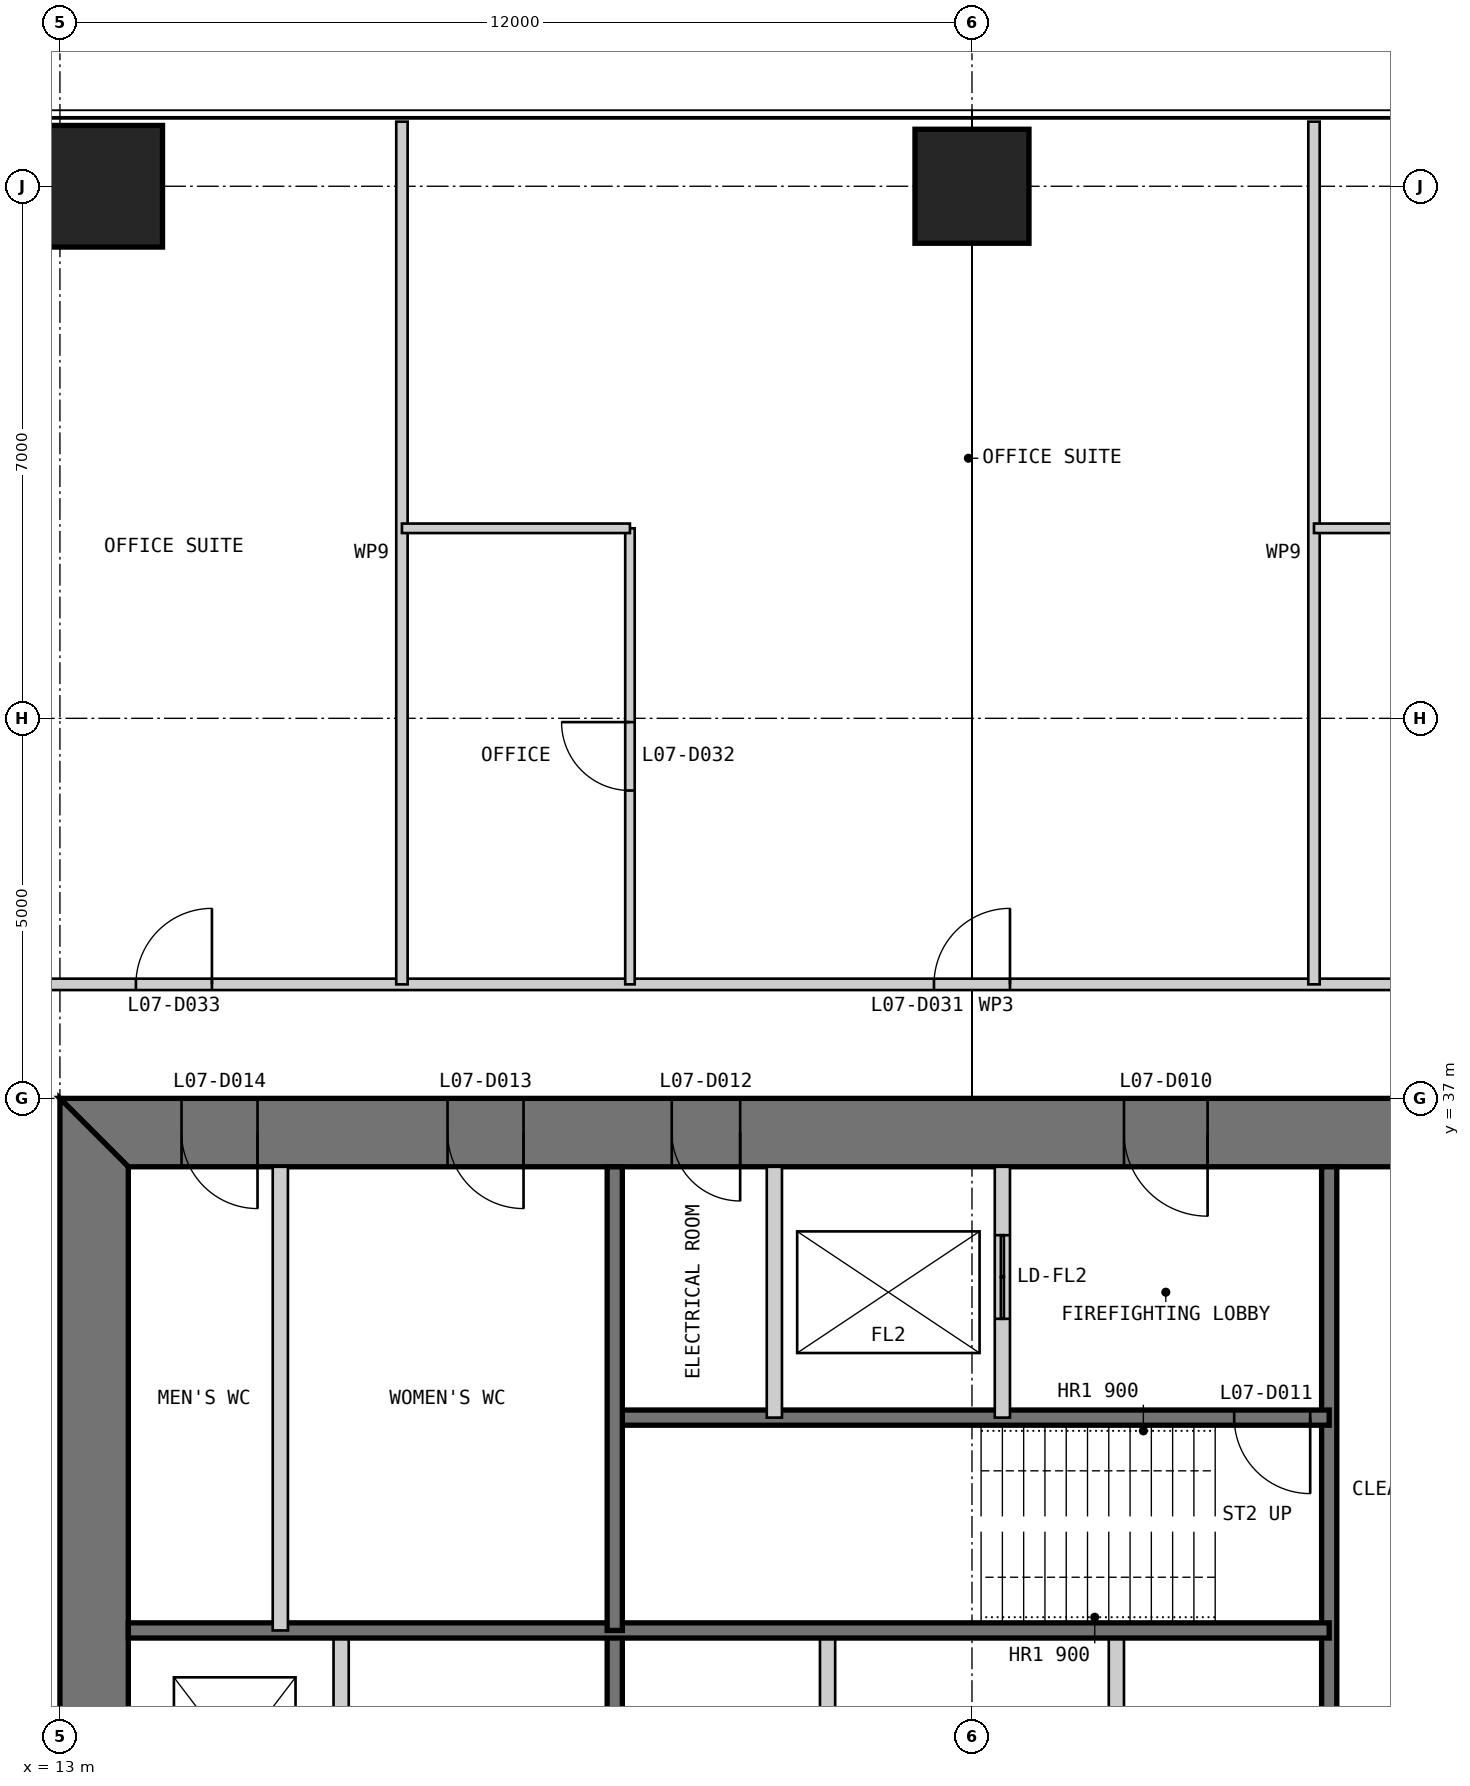
"""IFC4 building model, lengths in metres.
Left out: names, types, materials, properties, quantities, classifications, styles, units other than length and angle.
Written with IfcOpenShell. Run it as: python <this file> out.ifc"""

import sys

from ifc_helpers import new_model, si_unit, direction, frame, frame_2d, origin, origin_2d, place, context, subcontext, project, spatial, polyline, rectangle, outline, extrude, element, fill, save


model = new_model("IFC4")
c1 = context("Model", 3, precision=1e-05, world=origin(), true_north=direction((0.0, 1.0)))
c2 = subcontext(c1, "Body", "Model", "MODEL_VIEW")
j1 = project(units=[si_unit("LENGTHUNIT", "METRE"), si_unit("PLANEANGLEUNIT", "RADIAN")], contexts=[c1])
p1 = place(None, origin())
s1 = spatial("IfcSite", under=j1, at=p1, CompositionType="ELEMENT")
p2 = place(p1, origin())
s2 = spatial("IfcBuilding", under=s1, at=p2, CompositionType="ELEMENT")
p3 = place(p2, frame((0.0, 0.0, 35.0)))
s3 = spatial("IfcBuildingStorey", under=s2, at=p3, CompositionType="ELEMENT", Elevation=35.0)
p4 = place(p3, frame((25.0, 49.0, 0.0), z_axis=(0.0, 0.0, 1.0), x_axis=(1.0, 0.0, 0.0)))
e1 = element("IfcColumn", 1, at=p4, inside=s3, PredefinedType="COLUMN", context=c2, shape_type="SweptSolid", body=[
    extrude(rectangle(XDim=1.5, YDim=1.5, at=origin_2d()), origin(), (0.0, 0.0, 1.0), 4.0),
])
p5 = place(p3, frame((13.0, 49.0, 0.0), z_axis=(0.0, 0.0, 1.0), x_axis=(1.0, 0.0, 0.0)))
e2 = element("IfcColumn", 2, at=p5, inside=s3, PredefinedType="COLUMN", context=c2, shape_type="SweptSolid", body=[
    extrude(rectangle(XDim=2.7, YDim=1.6, at=origin_2d()), origin(), (0.0, 0.0, 1.0), 4.0),
])
p6 = place(p3, frame((37.0, 36.55, 0.0), z_axis=(0.0, 0.0, 1.0), x_axis=(-1.0, 0.0, 0.0)))
e3 = element("IfcWall", 3, at=p6, inside=s3, PredefinedType="SHEAR", context=c2, shape_type="SweptSolid", body=[
    extrude(outline(polyline([(0.0, -0.45), (24.0, -0.45), (23.1, 0.45), (0.9, 0.45), (0.0, -0.45)])), origin(), (0.0, 0.0, 1.0), 4.0),
])
p7 = place(p6, frame((4.9, 0.0, 0.0)))
e4 = element("IfcOpeningElement", 4, at=p7, cuts=e3, PredefinedType="OPENING", context=c2, shape_type="SweptSolid", body=[
    extrude(rectangle(XDim=1.0, YDim=2.2, at=frame_2d((0.5, 1.1))), frame((0.0, 0.46, 0.0), z_axis=(0.0, -1.0, 0.0), x_axis=(1.0, 0.0, 0.0)), (0.0, 0.0, 1.0), 0.92),
])
p8 = place(p6, frame((8.9, 0.0, 0.0)))
e5 = element("IfcOpeningElement", 5, at=p8, cuts=e3, PredefinedType="OPENING", context=c2, shape_type="SweptSolid", body=[
    extrude(rectangle(XDim=1.1, YDim=2.2, at=frame_2d((0.55, 1.1))), frame((0.0, 0.46, 0.0), z_axis=(0.0, -1.0, 0.0), x_axis=(1.0, 0.0, 0.0)), (0.0, 0.0, 1.0), 0.92),
])
p9 = place(p6, frame((15.05, 0.0, 0.0)))
e6 = element("IfcOpeningElement", 6, at=p9, cuts=e3, PredefinedType="OPENING", context=c2, shape_type="SweptSolid", body=[
    extrude(rectangle(XDim=0.9, YDim=2.2, at=frame_2d((0.45, 1.1))), frame((0.0, 0.46, 0.0), z_axis=(0.0, -1.0, 0.0), x_axis=(1.0, 0.0, 0.0)), (0.0, 0.0, 1.0), 0.92),
])
p10 = place(p6, frame((17.9, 0.0, 0.0)))
e7 = element("IfcOpeningElement", 7, at=p10, cuts=e3, PredefinedType="OPENING", context=c2, shape_type="SweptSolid", body=[
    extrude(rectangle(XDim=1.0, YDim=2.2, at=frame_2d((0.5, 1.1))), frame((0.0, 0.46, 0.0), z_axis=(0.0, -1.0, 0.0), x_axis=(1.0, 0.0, 0.0)), (0.0, 0.0, 1.0), 0.92),
])
p11 = place(p6, frame((21.4, 0.0, 0.0)))
e8 = element("IfcOpeningElement", 8, at=p11, cuts=e3, PredefinedType="OPENING", context=c2, shape_type="SweptSolid", body=[
    extrude(rectangle(XDim=1.0, YDim=2.2, at=frame_2d((0.5, 1.1))), frame((0.0, 0.46, 0.0), z_axis=(0.0, -1.0, 0.0), x_axis=(1.0, 0.0, 0.0)), (0.0, 0.0, 1.0), 0.92),
])
p12 = place(p3, frame((13.45, 36.1, 0.0), z_axis=(0.0, 0.0, 1.0), x_axis=(0.0, -1.0, 0.0)))
e9 = element("IfcWall", 9, at=p12, inside=s3, PredefinedType="SHEAR", context=c2, shape_type="SweptSolid", body=[
    extrude(outline(polyline([(-0.9, -0.45), (23.1, -0.45), (22.2, 0.45), (0.0, 0.45), (-0.9, -0.45)])), origin(), (0.0, 0.0, 1.0), 4.0),
])
p13 = place(p12, frame((20.2, 0.0, 0.0)))
e10 = element("IfcOpeningElement", 10, at=p13, cuts=e9, PredefinedType="OPENING", context=c2, shape_type="SweptSolid", body=[
    extrude(rectangle(XDim=1.0, YDim=2.2, at=frame_2d((0.5, 1.1))), frame((0.0, 0.46, 0.0), z_axis=(0.0, -1.0, 0.0), x_axis=(1.0, 0.0, 0.0)), (0.0, 0.0, 1.0), 0.92),
])
p14 = place(p12, frame((17.25, 0.0, 0.0)))
e11 = element("IfcOpeningElement", 11, at=p14, cuts=e9, PredefinedType="OPENING", context=c2, shape_type="SweptSolid", body=[
    extrude(rectangle(XDim=0.9, YDim=2.2, at=frame_2d((0.45, 1.1))), frame((0.0, 0.46, 0.0), z_axis=(0.0, -1.0, 0.0), x_axis=(1.0, 0.0, 0.0)), (0.0, 0.0, 1.0), 0.92),
])
p15 = place(p3, frame((16.7, 13.9, 0.0), z_axis=(0.0, 0.0, 1.0), x_axis=(0.0, 1.0, 0.0)))
e12 = element("IfcWall", 12, at=p15, inside=s3, PredefinedType="PARTITIONING", context=c2, shape_type="SweptSolid", body=[
    extrude(rectangle(XDim=16.1, YDim=0.2, at=frame_2d((8.05, 0.0))), origin(), (0.0, 0.0, 1.0), 3.8),
])
p16 = place(p15, frame((7.217, 0.0, 0.0)))
e13 = element("IfcOpeningElement", 13, at=p16, cuts=e12, PredefinedType="OPENING", context=c2, shape_type="SweptSolid", body=[
    extrude(rectangle(XDim=1.1, YDim=2.2, at=frame_2d((0.55, 1.1))), frame((0.0, 0.11, 0.0), z_axis=(0.0, -1.0, 0.0), x_axis=(1.0, 0.0, 0.0)), (0.0, 0.0, 1.0), 0.22),
])
p17 = place(p15, frame((10.55, 0.0, 0.0)))
e14 = element("IfcOpeningElement", 14, at=p17, cuts=e12, PredefinedType="OPENING", context=c2, shape_type="SweptSolid", body=[
    extrude(rectangle(XDim=1.1, YDim=2.2, at=frame_2d((0.55, 1.1))), frame((0.0, 0.11, 0.0), z_axis=(0.0, -1.0, 0.0), x_axis=(1.0, 0.0, 0.0)), (0.0, 0.0, 1.0), 0.22),
])
p18 = place(p15, frame((13.883, 0.0, 0.0)))
e15 = element("IfcOpeningElement", 15, at=p18, cuts=e12, PredefinedType="OPENING", context=c2, shape_type="SweptSolid", body=[
    extrude(rectangle(XDim=1.1, YDim=2.2, at=frame_2d((0.55, 1.1))), frame((0.0, 0.11, 0.0), z_axis=(0.0, -1.0, 0.0), x_axis=(1.0, 0.0, 0.0)), (0.0, 0.0, 1.0), 0.22),
])
p19 = place(p3, frame((20.3, 13.9, 0.0), z_axis=(0.0, 0.0, 1.0), x_axis=(0.0, 1.0, 0.0)))
e16 = element("IfcWall", 16, at=p19, inside=s3, PredefinedType="SOLIDWALL", context=c2, shape_type="SweptSolid", body=[
    extrude(rectangle(XDim=16.1, YDim=0.2, at=frame_2d((8.05, 0.0))), origin(), (0.0, 0.0, 1.0), 3.8),
])
p20 = place(p3, frame((23.1, 20.0, 0.0), z_axis=(0.0, 0.0, 1.0), x_axis=(0.0, 1.0, 0.0)))
e17 = element("IfcWall", 17, at=p20, inside=s3, PredefinedType="PARTITIONING", context=c2, shape_type="SweptSolid", body=[
    extrude(rectangle(XDim=10.0, YDim=0.2, at=frame_2d((5.0, 0.0))), origin(), (0.0, 0.0, 1.0), 3.8),
])
p21 = place(p3, frame((29.7, 36.1, 0.0), z_axis=(0.0, 0.0, 1.0), x_axis=(0.0, -1.0, 0.0)))
e18 = element("IfcWall", 18, at=p21, inside=s3, PredefinedType="SOLIDWALL", context=c2, shape_type="SweptSolid", body=[
    extrude(rectangle(XDim=16.1, YDim=0.2, at=frame_2d((8.05, 0.0))), origin(), (0.0, 0.0, 1.0), 3.8),
])
p22 = place(p3, frame((26.9, 30.0, 0.0), z_axis=(0.0, 0.0, 1.0), x_axis=(0.0, -1.0, 0.0)))
e19 = element("IfcWall", 19, at=p22, inside=s3, PredefinedType="PARTITIONING", context=c2, shape_type="SweptSolid", body=[
    extrude(rectangle(XDim=10.0, YDim=0.2, at=frame_2d((5.0, 0.0))), origin(), (0.0, 0.0, 1.0), 3.8),
])
p23 = place(p3, frame((29.7, 32.8, 0.0), z_axis=(0.0, 0.0, 1.0), x_axis=(-1.0, 0.0, 0.0)))
e20 = element("IfcWall", 20, at=p23, inside=s3, PredefinedType="SOLIDWALL", context=c2, shape_type="SweptSolid", body=[
    extrude(rectangle(XDim=9.4, YDim=0.2, at=frame_2d((4.7, 0.0))), origin(), (0.0, 0.0, 1.0), 3.8),
])
p24 = place(p23, frame((0.25, 0.0, 0.0)))
e21 = element("IfcOpeningElement", 21, at=p24, cuts=e20, PredefinedType="OPENING", context=c2, shape_type="SweptSolid", body=[
    extrude(rectangle(XDim=1.0, YDim=2.2, at=frame_2d((0.5, 1.1))), frame((0.0, 0.11, 0.0), z_axis=(0.0, -1.0, 0.0), x_axis=(1.0, 0.0, 0.0)), (0.0, 0.0, 1.0), 0.22),
])
p25 = place(p3, frame((29.7, 30.0, 0.0), z_axis=(0.0, 0.0, 1.0), x_axis=(-1.0, 0.0, 0.0)))
e22 = element("IfcWall", 22, at=p25, inside=s3, PredefinedType="SOLIDWALL", context=c2, shape_type="SweptSolid", body=[
    extrude(rectangle(XDim=15.8, YDim=0.2, at=frame_2d((7.9, 0.0))), origin(), (0.0, 0.0, 1.0), 3.8),
])
p26 = place(p3, frame((25.4, 36.1, 0.0), z_axis=(0.0, 0.0, 1.0), x_axis=(0.0, -1.0, 0.0)))
e23 = element("IfcWall", 23, at=p26, inside=s3, PredefinedType="PARTITIONING", context=c2, shape_type="SweptSolid", body=[
    extrude(rectangle(XDim=3.3, YDim=0.2, at=frame_2d((1.65, 0.0))), origin(), (0.0, 0.0, 1.0), 3.8),
])
p27 = place(p26, frame((0.9, 0.0, 0.0)))
e24 = element("IfcOpeningElement", 24, at=p27, cuts=e23, PredefinedType="OPENING", context=c2, shape_type="SweptSolid", body=[
    extrude(rectangle(XDim=1.1, YDim=2.2, at=frame_2d((0.55, 1.1))), frame((0.0, 0.11, 0.0), z_axis=(0.0, -1.0, 0.0), x_axis=(1.0, 0.0, 0.0)), (0.0, 0.0, 1.0), 0.22),
])
p28 = place(p3, frame((22.4, 36.1, 0.0), z_axis=(0.0, 0.0, 1.0), x_axis=(0.0, -1.0, 0.0)))
e25 = element("IfcWall", 25, at=p28, inside=s3, PredefinedType="PARTITIONING", context=c2, shape_type="SweptSolid", body=[
    extrude(rectangle(XDim=3.3, YDim=0.2, at=frame_2d((1.65, 0.0))), origin(), (0.0, 0.0, 1.0), 3.8),
])
p29 = place(p3, frame((20.3, 36.1, 0.0), z_axis=(0.0, 0.0, 1.0), x_axis=(0.0, -1.0, 0.0)))
e26 = element("IfcWall", 26, at=p29, inside=s3, PredefinedType="SOLIDWALL", context=c2, shape_type="SweptSolid", body=[
    extrude(rectangle(XDim=6.1, YDim=0.2, at=frame_2d((3.05, 0.0))), origin(), (0.0, 0.0, 1.0), 3.8),
])
p30 = place(p3, frame((15.9, 36.1, 0.0), z_axis=(0.0, 0.0, 1.0), x_axis=(0.0, -1.0, 0.0)))
e27 = element("IfcWall", 27, at=p30, inside=s3, PredefinedType="PARTITIONING", context=c2, shape_type="SweptSolid", body=[
    extrude(rectangle(XDim=6.1, YDim=0.2, at=frame_2d((3.05, 0.0))), origin(), (0.0, 0.0, 1.0), 3.8),
])
p31 = place(p3, frame((38.5, 38.5, 0.0), z_axis=(0.0, 0.0, 1.0), x_axis=(-1.0, 0.0, 0.0)))
e28 = element("IfcWall", 28, at=p31, inside=s3, PredefinedType="PARTITIONING", context=c2, shape_type="SweptSolid", body=[
    extrude(rectangle(XDim=27.0, YDim=0.15, at=frame_2d((13.5, 0.0))), origin(), (0.0, 0.0, 1.0), 3.85),
])
p32 = place(p31, frame((2.5, 0.0, 0.0)))
e29 = element("IfcOpeningElement", 29, at=p32, cuts=e28, PredefinedType="OPENING", context=c2, shape_type="SweptSolid", body=[
    extrude(rectangle(XDim=1.0, YDim=2.2, at=frame_2d((0.5, 1.1))), frame((0.0, 0.085, 0.0), z_axis=(0.0, -1.0, 0.0), x_axis=(1.0, 0.0, 0.0)), (0.0, 0.0, 1.0), 0.17),
])
p33 = place(p31, frame((13.0, 0.0, 0.0)))
e30 = element("IfcOpeningElement", 30, at=p33, cuts=e28, PredefinedType="OPENING", context=c2, shape_type="SweptSolid", body=[
    extrude(rectangle(XDim=1.0, YDim=2.2, at=frame_2d((0.5, 1.1))), frame((0.0, 0.085, 0.0), z_axis=(0.0, -1.0, 0.0), x_axis=(1.0, 0.0, 0.0)), (0.0, 0.0, 1.0), 0.17),
])
p34 = place(p31, frame((23.5, 0.0, 0.0)))
e31 = element("IfcOpeningElement", 31, at=p34, cuts=e28, PredefinedType="OPENING", context=c2, shape_type="SweptSolid", body=[
    extrude(rectangle(XDim=1.0, YDim=2.2, at=frame_2d((0.5, 1.1))), frame((0.0, 0.085, 0.0), z_axis=(0.0, -1.0, 0.0), x_axis=(1.0, 0.0, 0.0)), (0.0, 0.0, 1.0), 0.17),
])
p35 = place(p3, frame((29.5, 49.85, 0.0), z_axis=(0.0, 0.0, 1.0), x_axis=(0.0, -1.0, 0.0)))
e32 = element("IfcWall", 32, at=p35, inside=s3, PredefinedType="PARTITIONING", context=c2, shape_type="SweptSolid", body=[
    extrude(rectangle(XDim=11.35, YDim=0.15, at=frame_2d((5.675, 0.0))), origin(), (0.0, 0.0, 1.0), 3.85),
])
p36 = place(p3, frame((20.5, 44.5, 0.0), z_axis=(0.0, 0.0, 1.0), x_axis=(0.0, -1.0, 0.0)))
e33 = element("IfcWall", 33, at=p36, inside=s3, PredefinedType="PARTITIONING", context=c2, shape_type="SweptSolid", body=[
    extrude(rectangle(XDim=6.0, YDim=0.125, at=frame_2d((3.0, 0.0))), origin(), (0.0, 0.0, 1.0), 3.85),
])
p37 = place(p36, frame((2.55, 0.0, 0.0)))
e34 = element("IfcOpeningElement", 34, at=p37, cuts=e33, PredefinedType="OPENING", context=c2, shape_type="SweptSolid", body=[
    extrude(rectangle(XDim=0.9, YDim=2.2, at=frame_2d((0.45, 1.1))), frame((0.0, 0.073, 0.0), z_axis=(0.0, -1.0, 0.0), x_axis=(1.0, 0.0, 0.0)), (0.0, 0.0, 1.0), 0.145),
])
p38 = place(p3, frame((17.5, 49.85, 0.0), z_axis=(0.0, 0.0, 1.0), x_axis=(0.0, -1.0, 0.0)))
e35 = element("IfcWall", 35, at=p38, inside=s3, PredefinedType="PARTITIONING", context=c2, shape_type="SweptSolid", body=[
    extrude(rectangle(XDim=11.35, YDim=0.15, at=frame_2d((5.675, 0.0))), origin(), (0.0, 0.0, 1.0), 3.85),
])
p39 = place(p3, frame((35.5, 44.5, 0.0), z_axis=(0.0, 0.0, 1.0), x_axis=(-1.0, 0.0, 0.0)))
e36 = element("IfcWall", 36, at=p39, inside=s3, PredefinedType="PARTITIONING", context=c2, shape_type="SweptSolid", body=[
    extrude(rectangle(XDim=6.0, YDim=0.125, at=frame_2d((3.0, 0.0))), origin(), (0.0, 0.0, 1.0), 3.85),
])
p40 = place(p3, frame((20.5, 44.5, 0.0), z_axis=(0.0, 0.0, 1.0), x_axis=(-1.0, 0.0, 0.0)))
e37 = element("IfcWall", 37, at=p40, inside=s3, PredefinedType="PARTITIONING", context=c2, shape_type="SweptSolid", body=[
    extrude(rectangle(XDim=3.0, YDim=0.125, at=frame_2d((1.5, 0.0))), origin(), (0.0, 0.0, 1.0), 3.85),
])
p41 = place(p8, origin())
e38 = element("IfcDoor", 38, at=p41, inside=s3, OperationType="SINGLE_SWING_LEFT", PredefinedType="DOOR", context=c2, shape_type="SweptSolid", body=[
    extrude(rectangle(XDim=1.1, YDim=2.2, at=frame_2d((0.55, 1.1))), frame((0.0, 0.025, 0.0), z_axis=(0.0, -1.0, 0.0), x_axis=(1.0, 0.0, 0.0)), (0.0, 0.0, 1.0), 0.05),
    extrude(outline(polyline([(0.0, 0.0), (0.04, 0.0), (0.04, 2.16), (1.06, 2.16), (1.06, 0.0), (1.1, 0.0), (1.1, 2.2), (0.0, 2.2), (0.0, 0.0)])), frame((0.0, 0.3, 0.0), z_axis=(0.0, -1.0, 0.0), x_axis=(1.0, 0.0, 0.0)), (0.0, 0.0, 1.0), 0.6),
])
fill(e5, e38)
p42 = place(p24, origin())
e39 = element("IfcDoor", 39, at=p42, inside=s3, OperationType="SINGLE_SWING_LEFT", PredefinedType="DOOR", context=c2, shape_type="SweptSolid", body=[
    extrude(rectangle(XDim=1.0, YDim=2.2, at=frame_2d((0.5, 1.1))), frame((0.0, 0.025, 0.0), z_axis=(0.0, -1.0, 0.0), x_axis=(1.0, 0.0, 0.0)), (0.0, 0.0, 1.0), 0.05),
])
fill(e21, e39)
p43 = place(p9, origin())
e40 = element("IfcDoor", 40, at=p43, inside=s3, OperationType="SINGLE_SWING_LEFT", PredefinedType="DOOR", context=c2, shape_type="SweptSolid", body=[
    extrude(rectangle(XDim=0.9, YDim=2.2, at=frame_2d((0.45, 1.1))), frame((0.0, 0.025, 0.0), z_axis=(0.0, -1.0, 0.0), x_axis=(1.0, 0.0, 0.0)), (0.0, 0.0, 1.0), 0.05),
    extrude(outline(polyline([(0.0, 0.0), (0.04, 0.0), (0.04, 2.16), (0.86, 2.16), (0.86, 0.0), (0.9, 0.0), (0.9, 2.2), (0.0, 2.2), (0.0, 0.0)])), frame((0.0, 0.3, 0.0), z_axis=(0.0, -1.0, 0.0), x_axis=(1.0, 0.0, 0.0)), (0.0, 0.0, 1.0), 0.6),
])
fill(e6, e40)
p44 = place(p10, origin())
e41 = element("IfcDoor", 41, at=p44, inside=s3, OperationType="SINGLE_SWING_LEFT", PredefinedType="DOOR", context=c2, shape_type="SweptSolid", body=[
    extrude(rectangle(XDim=1.0, YDim=2.2, at=frame_2d((0.5, 1.1))), frame((0.0, 0.025, 0.0), z_axis=(0.0, -1.0, 0.0), x_axis=(1.0, 0.0, 0.0)), (0.0, 0.0, 1.0), 0.05),
    extrude(outline(polyline([(0.0, 0.0), (0.04, 0.0), (0.04, 2.16), (0.96, 2.16), (0.96, 0.0), (1.0, 0.0), (1.0, 2.2), (0.0, 2.2), (0.0, 0.0)])), frame((0.0, 0.3, 0.0), z_axis=(0.0, -1.0, 0.0), x_axis=(1.0, 0.0, 0.0)), (0.0, 0.0, 1.0), 0.6),
])
fill(e7, e41)
p45 = place(p11, origin())
e42 = element("IfcDoor", 42, at=p45, inside=s3, OperationType="SINGLE_SWING_LEFT", PredefinedType="DOOR", context=c2, shape_type="SweptSolid", body=[
    extrude(rectangle(XDim=1.0, YDim=2.2, at=frame_2d((0.5, 1.1))), frame((0.0, 0.025, 0.0), z_axis=(0.0, -1.0, 0.0), x_axis=(1.0, 0.0, 0.0)), (0.0, 0.0, 1.0), 0.05),
    extrude(outline(polyline([(0.0, 0.0), (0.04, 0.0), (0.04, 2.16), (0.96, 2.16), (0.96, 0.0), (1.0, 0.0), (1.0, 2.2), (0.0, 2.2), (0.0, 0.0)])), frame((0.0, 0.3, 0.0), z_axis=(0.0, -1.0, 0.0), x_axis=(1.0, 0.0, 0.0)), (0.0, 0.0, 1.0), 0.6),
])
fill(e8, e42)
p46 = place(p33, frame((1.0, 0.0, 0.0), z_axis=(0.0, 0.0, 1.0), x_axis=(-1.0, 0.0, 0.0)))
e43 = element("IfcDoor", 43, at=p46, inside=s3, OperationType="SINGLE_SWING_RIGHT", PredefinedType="DOOR", context=c2, shape_type="SweptSolid", body=[
    extrude(rectangle(XDim=1.0, YDim=2.2, at=frame_2d((0.5, 1.1))), frame((0.0, 0.025, 0.0), z_axis=(0.0, -1.0, 0.0), x_axis=(1.0, 0.0, 0.0)), (0.0, 0.0, 1.0), 0.05),
])
fill(e30, e43)
p47 = place(p37, frame((0.9, 0.0, 0.0), z_axis=(0.0, 0.0, 1.0), x_axis=(-1.0, 0.0, 0.0)))
e44 = element("IfcDoor", 44, at=p47, inside=s3, OperationType="SINGLE_SWING_RIGHT", PredefinedType="DOOR", context=c2, shape_type="SweptSolid", body=[
    extrude(rectangle(XDim=0.9, YDim=2.2, at=frame_2d((0.45, 1.1))), frame((0.0, 0.025, 0.0), z_axis=(0.0, -1.0, 0.0), x_axis=(1.0, 0.0, 0.0)), (0.0, 0.0, 1.0), 0.05),
])
fill(e34, e44)
p48 = place(p34, frame((1.0, 0.0, 0.0), z_axis=(0.0, 0.0, 1.0), x_axis=(-1.0, 0.0, 0.0)))
e45 = element("IfcDoor", 45, at=p48, inside=s3, OperationType="SINGLE_SWING_RIGHT", PredefinedType="DOOR", context=c2, shape_type="SweptSolid", body=[
    extrude(rectangle(XDim=1.0, YDim=2.2, at=frame_2d((0.5, 1.1))), frame((0.0, 0.025, 0.0), z_axis=(0.0, -1.0, 0.0), x_axis=(1.0, 0.0, 0.0)), (0.0, 0.0, 1.0), 0.05),
])
fill(e31, e45)
p49 = place(p27, origin())
e46 = element("IfcDoor", 46, at=p49, inside=s3, OperationType="DOUBLE_DOOR_SLIDING", PredefinedType="DOOR", context=c2, shape_type="SweptSolid", body=[
    extrude(rectangle(XDim=1.1, YDim=2.2, at=frame_2d((0.55, 1.1))), frame((0.0, 0.025, 0.0), z_axis=(0.0, -1.0, 0.0), x_axis=(1.0, 0.0, 0.0)), (0.0, 0.0, 1.0), 0.05),
])
fill(e24, e46)
save(model, sys.argv[1])
